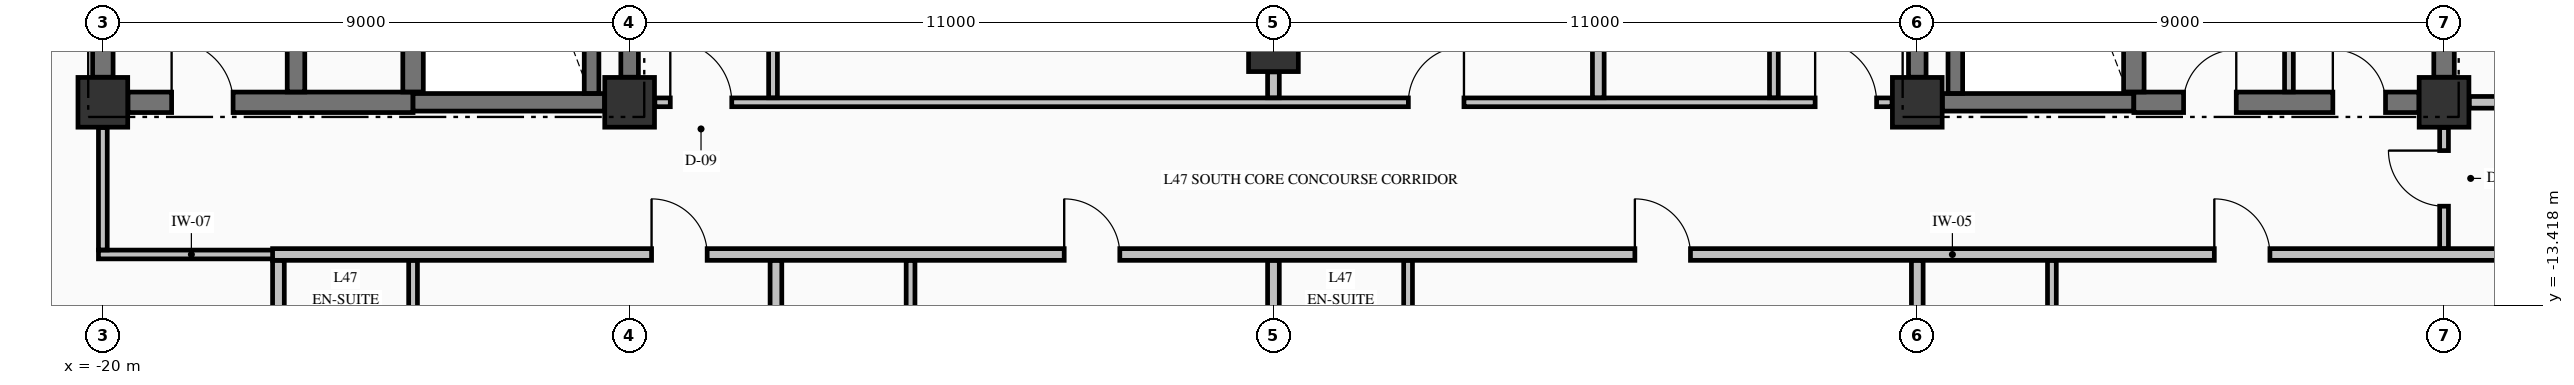
"""IFC4 building model, lengths in metres.
Left out: names, types, materials, properties, quantities, classifications, styles, units other than length and angle.
Written with IfcOpenShell. Run it as: python <this file> out.ifc"""

import sys

from ifc_helpers import new_model, si_unit, direction, frame, frame_2d, origin, origin_2d, place, context, subcontext, project, spatial, rectangle, extrude, element, fill, save


model = new_model("IFC4")
c1 = context("Model", 3, precision=1e-05, world=origin(), true_north=direction((0.0, 1.0)))
c2 = subcontext(c1, "Body", "Model", "MODEL_VIEW")
j1 = project(units=[si_unit("LENGTHUNIT", "METRE"), si_unit("PLANEANGLEUNIT", "RADIAN")], contexts=[c1])
p1 = place(None, origin())
s1 = spatial("IfcSite", under=j1, at=p1, CompositionType="ELEMENT")
p2 = place(p1, origin())
s2 = spatial("IfcBuilding", under=s1, at=p2, CompositionType="ELEMENT")
p3 = place(p2, frame((0.0, 0.0, 183.06)))
s3 = spatial("IfcBuildingStorey", under=s2, at=p3, CompositionType="ELEMENT", Elevation=183.06)
for number, where, z_axis, x_axis in (
    (1, (-20.0, -9.95, -0.25), (0.0, 0.0, 1.0), (1.0, 0.0, 0.0)),
    (2, (-11.0, -9.95, -0.25), (0.0, 0.0, 1.0), (1.0, 0.0, 0.0)),
    (3, (11.0, -9.95, -0.25), (0.0, 0.0, 1.0), (1.0, 0.0, 0.0)),
    (4, (20.0, -9.95, -0.25), (0.0, 0.0, 1.0), (1.0, 0.0, 0.0)),
    (5, (0.0, -9.0, -0.25), (0.0, 0.0, 1.0), (1.0, 0.0, 0.0)),
):
    element("IfcColumn", number, at=place(p3, frame(where, z_axis=z_axis, x_axis=x_axis)), inside=s3, PredefinedType="COLUMN", context=c2, shape_type="SweptSolid", body=[
        extrude(rectangle(XDim=0.85, YDim=0.85, at=origin_2d()), origin(), (0.0, 0.0, 1.0), 3.225),
    ])
p4 = place(p3, frame((-19.571, -9.95, 0.0), z_axis=(0.0, 0.0, 1.0), x_axis=(1.0, 0.0, 0.0)))
e6 = element("IfcWall", 6, at=p4, inside=s3, PredefinedType="SHEAR", context=c2, shape_type="SweptSolid", body=[
    extrude(rectangle(XDim=4.871, YDim=0.35, at=frame_2d((2.436, 0.0))), origin(), (0.0, 0.0, 1.0), 2.975),
])
p5 = place(p4, frame((0.746, 0.0, 0.0)))
e7 = element("IfcOpeningElement", 7, at=p5, cuts=e6, PredefinedType="OPENING", context=c2, shape_type="SweptSolid", body=[
    extrude(rectangle(XDim=1.05, YDim=2.15, at=frame_2d((0.525, 1.075))), frame((0.0, 0.185, 0.0), z_axis=(0.0, -1.0, 0.0), x_axis=(1.0, 0.0, 0.0)), (0.0, 0.0, 1.0), 0.37),
])
for number, where, z_axis, x_axis in (
    (8, (-14.7, -9.95, 0.0), (0.0, 0.0, 1.0), (1.0, 0.0, 0.0)),
    (9, (11.429, -9.95, 0.0), (0.0, 0.0, 1.0), (1.0, 0.0, 0.0)),
):
    element("IfcWall", number, at=place(p3, frame(where, z_axis=z_axis, x_axis=x_axis)), inside=s3, PredefinedType="SHEAR", context=c2, shape_type="SweptSolid", body=[
        extrude(rectangle(XDim=3.271, YDim=0.3, at=frame_2d((1.635, 0.0))), origin(), (0.0, 0.0, 1.0), 2.975),
    ])
p6 = place(p3, frame((14.7, -9.95, 0.0), z_axis=(0.0, 0.0, 1.0), x_axis=(1.0, 0.0, 0.0)))
e10 = element("IfcWall", 10, at=p6, inside=s3, PredefinedType="SHEAR", context=c2, shape_type="SweptSolid", body=[
    extrude(rectangle(XDim=4.871, YDim=0.35, at=frame_2d((2.436, 0.0))), origin(), (0.0, 0.0, 1.0), 2.975),
])
p7 = place(p6, frame((0.85, 0.0, 0.0)))
e11 = element("IfcOpeningElement", 11, at=p7, cuts=e10, PredefinedType="OPENING", context=c2, shape_type="SweptSolid", body=[
    extrude(rectangle(XDim=0.9, YDim=2.15, at=frame_2d((0.45, 1.075))), frame((0.0, 0.185, 0.0), z_axis=(0.0, -1.0, 0.0), x_axis=(1.0, 0.0, 0.0)), (0.0, 0.0, 1.0), 0.37),
])
p8 = place(p6, frame((3.4, 0.0, 0.0)))
e12 = element("IfcOpeningElement", 12, at=p8, cuts=e10, PredefinedType="OPENING", context=c2, shape_type="SweptSolid", body=[
    extrude(rectangle(XDim=0.9, YDim=2.15, at=frame_2d((0.45, 1.075))), frame((0.0, 0.185, 0.0), z_axis=(0.0, -1.0, 0.0), x_axis=(1.0, 0.0, 0.0)), (0.0, 0.0, 1.0), 0.37),
])
p9 = place(p3, frame((-20.075, -12.55, 0.0), z_axis=(0.0, 0.0, 1.0), x_axis=(1.0, 0.0, 0.0)))
e13 = element("IfcWall", 13, at=p9, inside=s3, PredefinedType="PARTITIONING", context=c2, shape_type="SweptSolid", body=[
    extrude(rectangle(XDim=3.175, YDim=0.15, at=frame_2d((1.587, 0.0))), origin(), (0.0, 0.0, 1.0), 2.975),
])
p10 = place(p3, frame((-17.1, -12.55, 0.0), z_axis=(0.0, 0.0, 1.0), x_axis=(1.0, 0.0, 0.0)))
e14 = element("IfcWall", 14, at=p10, inside=s3, PredefinedType="PARTITIONING", context=c2, shape_type="SweptSolid", body=[
    extrude(rectangle(XDim=39.2, YDim=0.2, at=frame_2d((19.6, 0.0))), origin(), (0.0, 0.0, 1.0), 2.975),
])
p11 = place(p10, frame((6.475, 0.0, 0.0)))
e15 = element("IfcOpeningElement", 15, at=p11, cuts=e14, PredefinedType="OPENING", context=c2, shape_type="SweptSolid", body=[
    extrude(rectangle(XDim=0.95, YDim=2.15, at=frame_2d((0.475, 1.075))), frame((0.0, 0.11, 0.0), z_axis=(0.0, -1.0, 0.0), x_axis=(1.0, 0.0, 0.0)), (0.0, 0.0, 1.0), 0.22),
])
p12 = place(p10, frame((13.525, 0.0, 0.0)))
e16 = element("IfcOpeningElement", 16, at=p12, cuts=e14, PredefinedType="OPENING", context=c2, shape_type="SweptSolid", body=[
    extrude(rectangle(XDim=0.95, YDim=2.15, at=frame_2d((0.475, 1.075))), frame((0.0, 0.11, 0.0), z_axis=(0.0, -1.0, 0.0), x_axis=(1.0, 0.0, 0.0)), (0.0, 0.0, 1.0), 0.22),
])
p13 = place(p10, frame((23.275, 0.0, 0.0)))
e17 = element("IfcOpeningElement", 17, at=p13, cuts=e14, PredefinedType="OPENING", context=c2, shape_type="SweptSolid", body=[
    extrude(rectangle(XDim=0.95, YDim=2.15, at=frame_2d((0.475, 1.075))), frame((0.0, 0.11, 0.0), z_axis=(0.0, -1.0, 0.0), x_axis=(1.0, 0.0, 0.0)), (0.0, 0.0, 1.0), 0.22),
])
p14 = place(p10, frame((33.175, 0.0, 0.0)))
e18 = element("IfcOpeningElement", 18, at=p14, cuts=e14, PredefinedType="OPENING", context=c2, shape_type="SweptSolid", body=[
    extrude(rectangle(XDim=0.95, YDim=2.15, at=frame_2d((0.475, 1.075))), frame((0.0, 0.11, 0.0), z_axis=(0.0, -1.0, 0.0), x_axis=(1.0, 0.0, 0.0)), (0.0, 0.0, 1.0), 0.22),
])
p15 = place(p3, frame((-10.569, -9.95, 0.0), z_axis=(0.0, 0.0, 1.0), x_axis=(1.0, 0.0, 0.0)))
e19 = element("IfcWall", 19, at=p15, inside=s3, PredefinedType="PARTITIONING", context=c2, shape_type="SweptSolid", body=[
    extrude(rectangle(XDim=21.138, YDim=0.15, at=frame_2d((10.569, 0.0))), origin(), (0.0, 0.0, 1.0), 2.975),
])
p16 = place(p15, frame((0.264, 0.0, 0.0)))
e20 = element("IfcOpeningElement", 20, at=p16, cuts=e19, PredefinedType="OPENING", context=c2, shape_type="SweptSolid", body=[
    extrude(rectangle(XDim=1.05, YDim=2.15, at=frame_2d((0.525, 1.075))), frame((0.0, 0.085, 0.0), z_axis=(0.0, -1.0, 0.0), x_axis=(1.0, 0.0, 0.0)), (0.0, 0.0, 1.0), 0.17),
])
p17 = place(p15, frame((19.824, 0.0, 0.0)))
e21 = element("IfcOpeningElement", 21, at=p17, cuts=e19, PredefinedType="OPENING", context=c2, shape_type="SweptSolid", body=[
    extrude(rectangle(XDim=1.05, YDim=2.15, at=frame_2d((0.525, 1.075))), frame((0.0, 0.085, 0.0), z_axis=(0.0, -1.0, 0.0), x_axis=(1.0, 0.0, 0.0)), (0.0, 0.0, 1.0), 0.17),
])
p18 = place(p15, frame((12.874, 0.0, 0.0)))
e22 = element("IfcOpeningElement", 22, at=p18, cuts=e19, PredefinedType="OPENING", context=c2, shape_type="SweptSolid", body=[
    extrude(rectangle(XDim=0.95, YDim=2.15, at=frame_2d((0.475, 1.075))), frame((0.0, 0.085, 0.0), z_axis=(0.0, -1.0, 0.0), x_axis=(1.0, 0.0, 0.0)), (0.0, 0.0, 1.0), 0.17),
])
p19 = place(p3, frame((20.431, -9.95, 0.0), z_axis=(0.0, 0.0, 1.0), x_axis=(1.0, 0.0, 0.0)))
e23 = element("IfcWall", 23, at=p19, inside=s3, PredefinedType="PARTITIONING", context=c2, shape_type="SweptSolid", body=[
    extrude(rectangle(XDim=6.404, YDim=0.2, at=frame_2d((3.202, 0.0))), origin(), (0.0, 0.0, 1.0), 2.975),
])
p20 = place(p19, frame((2.594, 0.0, 0.0)))
e24 = element("IfcOpeningElement", 24, at=p20, cuts=e23, PredefinedType="OPENING", context=c2, shape_type="SweptSolid", body=[
    extrude(rectangle(XDim=0.95, YDim=2.15, at=frame_2d((0.475, 1.075))), frame((0.0, 0.11, 0.0), z_axis=(0.0, -1.0, 0.0), x_axis=(1.0, 0.0, 0.0)), (0.0, 0.0, 1.0), 0.22),
])
p21 = place(p3, frame((-20.0, -9.521, 0.0), z_axis=(0.0, 0.0, 1.0), x_axis=(0.0, 1.0, 0.0)))
e25 = element("IfcWall", 25, at=p21, inside=s3, PredefinedType="SHEAR", context=c2, shape_type="SweptSolid", body=[
    extrude(rectangle(XDim=9.092, YDim=0.35, at=frame_2d((4.546, 0.0))), origin(), (0.0, 0.0, 1.0), 2.975),
])
p22 = place(p3, frame((-16.7, -9.773, 0.0), z_axis=(0.0, 0.0, 1.0), x_axis=(0.0, 1.0, 0.0)))
e26 = element("IfcWall", 26, at=p22, inside=s3, PredefinedType="SHEAR", context=c2, shape_type="SweptSolid", body=[
    extrude(rectangle(XDim=9.371, YDim=0.3, at=frame_2d((4.686, 0.0))), origin(), (0.0, 0.0, 1.0), 2.975),
])
p23 = place(p3, frame((-14.7, -9.773, 0.0), z_axis=(0.0, 0.0, 1.0), x_axis=(0.0, 1.0, 0.0)))
e27 = element("IfcWall", 27, at=p23, inside=s3, PredefinedType="SHEAR", context=c2, shape_type="SweptSolid", body=[
    extrude(rectangle(XDim=9.371, YDim=0.35, at=frame_2d((4.686, 0.0))), origin(), (0.0, 0.0, 1.0), 2.975),
])
p24 = place(p3, frame((-11.65, -9.798, 0.0), z_axis=(0.0, 0.0, 1.0), x_axis=(0.0, 1.0, 0.0)))
e28 = element("IfcWall", 28, at=p24, inside=s3, PredefinedType="SOLIDWALL", context=c2, shape_type="SweptSolid", body=[
    extrude(rectangle(XDim=9.396, YDim=0.25, at=frame_2d((4.698, 0.0))), origin(), (0.0, 0.0, 1.0), 2.975),
])
for number, where, z_axis, x_axis in (
    (29, (-11.0, -9.521, 0.0), (0.0, 0.0, 1.0), (0.0, 1.0, 0.0)),
    (30, (11.0, -9.521, 0.0), (0.0, 0.0, 1.0), (0.0, 1.0, 0.0)),
):
    element("IfcWall", number, at=place(p3, frame(where, z_axis=z_axis, x_axis=x_axis)), inside=s3, PredefinedType="SHEAR", context=c2, shape_type="SweptSolid", body=[
        extrude(rectangle(XDim=9.092, YDim=0.3, at=frame_2d((4.546, 0.0))), origin(), (0.0, 0.0, 1.0), 2.975),
    ])
p25 = place(p3, frame((11.65, -9.798, 0.0), z_axis=(0.0, 0.0, 1.0), x_axis=(0.0, 1.0, 0.0)))
e31 = element("IfcWall", 31, at=p25, inside=s3, PredefinedType="SOLIDWALL", context=c2, shape_type="SweptSolid", body=[
    extrude(rectangle(XDim=9.396, YDim=0.25, at=frame_2d((4.698, 0.0))), origin(), (0.0, 0.0, 1.0), 2.975),
])
p26 = place(p3, frame((14.7, -9.773, 0.0), z_axis=(0.0, 0.0, 1.0), x_axis=(0.0, 1.0, 0.0)))
e32 = element("IfcWall", 32, at=p26, inside=s3, PredefinedType="SHEAR", context=c2, shape_type="SweptSolid", body=[
    extrude(rectangle(XDim=9.371, YDim=0.35, at=frame_2d((4.686, 0.0))), origin(), (0.0, 0.0, 1.0), 2.975),
])
p27 = place(p3, frame((20.0, -9.521, 0.0), z_axis=(0.0, 0.0, 1.0), x_axis=(0.0, 1.0, 0.0)))
e33 = element("IfcWall", 33, at=p27, inside=s3, PredefinedType="SHEAR", context=c2, shape_type="SweptSolid", body=[
    extrude(rectangle(XDim=9.092, YDim=0.35, at=frame_2d((4.546, 0.0))), origin(), (0.0, 0.0, 1.0), 2.975),
])
p28 = place(p3, frame((-20.0, -12.472, 0.0), z_axis=(0.0, 0.0, 1.0), x_axis=(0.0, 1.0, 0.0)))
e34 = element("IfcWall", 34, at=p28, inside=s3, PredefinedType="PARTITIONING", context=c2, shape_type="SweptSolid", body=[
    extrude(rectangle(XDim=2.091, YDim=0.15, at=frame_2d((1.045, 0.0))), origin(), (0.0, 0.0, 1.0), 2.167),
])
p29 = place(p3, frame((-17.0, -15.422, 0.0), z_axis=(0.0, 0.0, 1.0), x_axis=(0.0, 1.0, 0.0)))
e35 = element("IfcWall", 35, at=p29, inside=s3, PredefinedType="PARTITIONING", context=c2, shape_type="SweptSolid", body=[
    extrude(rectangle(XDim=2.769, YDim=0.2, at=frame_2d((1.385, 0.0))), origin(), (0.0, 0.0, 1.0), 2.975),
])
p30 = place(p3, frame((-14.7, -15.422, 0.0), z_axis=(0.0, 0.0, 1.0), x_axis=(0.0, 1.0, 0.0)))
e36 = element("IfcWall", 36, at=p30, inside=s3, PredefinedType="PARTITIONING", context=c2, shape_type="SweptSolid", body=[
    extrude(rectangle(XDim=2.769, YDim=0.15, at=frame_2d((1.385, 0.0))), origin(), (0.0, 0.0, 1.0), 2.975),
])
p31 = place(p3, frame((-8.55, -9.872, 0.0), z_axis=(0.0, 0.0, 1.0), x_axis=(0.0, 1.0, 0.0)))
e37 = element("IfcWall", 37, at=p31, inside=s3, PredefinedType="PARTITIONING", context=c2, shape_type="SweptSolid", body=[
    extrude(rectangle(XDim=12.969, YDim=0.15, at=frame_2d((6.484, 0.0))), origin(), (0.0, 0.0, 1.0), 2.975),
])
p32 = place(p31, frame((6.002, 0.0, 0.0)))
e38 = element("IfcOpeningElement", 38, at=p32, cuts=e37, PredefinedType="OPENING", context=c2, shape_type="SweptSolid", body=[
    extrude(rectangle(XDim=1.0, YDim=2.15, at=frame_2d((0.5, 1.075))), frame((0.0, 0.085, 0.0), z_axis=(0.0, -1.0, 0.0), x_axis=(1.0, 0.0, 0.0)), (0.0, 0.0, 1.0), 0.17),
])
p33 = place(p3, frame((-8.5, -14.722, 0.0), z_axis=(0.0, 0.0, 1.0), x_axis=(0.0, 1.0, 0.0)))
e39 = element("IfcWall", 39, at=p33, inside=s3, PredefinedType="PARTITIONING", context=c2, shape_type="SweptSolid", body=[
    extrude(rectangle(XDim=2.069, YDim=0.2, at=frame_2d((1.034, 0.0))), origin(), (0.0, 0.0, 1.0), 2.975),
])
p34 = place(p3, frame((-6.2, -14.722, 0.0), z_axis=(0.0, 0.0, 1.0), x_axis=(0.0, 1.0, 0.0)))
e40 = element("IfcWall", 40, at=p34, inside=s3, PredefinedType="PARTITIONING", context=c2, shape_type="SweptSolid", body=[
    extrude(rectangle(XDim=2.069, YDim=0.15, at=frame_2d((1.034, 0.0))), origin(), (0.0, 0.0, 1.0), 2.975),
])
p35 = place(p3, frame((0.0, -15.422, 0.0), z_axis=(0.0, 0.0, 1.0), x_axis=(0.0, 1.0, 0.0)))
e41 = element("IfcWall", 41, at=p35, inside=s3, PredefinedType="PARTITIONING", context=c2, shape_type="SweptSolid", body=[
    extrude(rectangle(XDim=2.769, YDim=0.2, at=frame_2d((1.385, 0.0))), origin(), (0.0, 0.0, 1.0), 2.167),
])
p36 = place(p3, frame((0.0, -9.872, 0.0), z_axis=(0.0, 0.0, 1.0), x_axis=(0.0, 1.0, 0.0)))
e42 = element("IfcWall", 42, at=p36, inside=s3, PredefinedType="PARTITIONING", context=c2, shape_type="SweptSolid", body=[
    extrude(rectangle(XDim=0.441, YDim=0.2, at=frame_2d((0.221, 0.0))), origin(), (0.0, 0.0, 1.0), 2.167),
])
p37 = place(p3, frame((2.3, -15.422, 0.0), z_axis=(0.0, 0.0, 1.0), x_axis=(0.0, 1.0, 0.0)))
e43 = element("IfcWall", 43, at=p37, inside=s3, PredefinedType="PARTITIONING", context=c2, shape_type="SweptSolid", body=[
    extrude(rectangle(XDim=2.769, YDim=0.15, at=frame_2d((1.385, 0.0))), origin(), (0.0, 0.0, 1.0), 2.975),
])
p38 = place(p3, frame((5.55, -9.872, 0.0), z_axis=(0.0, 0.0, 1.0), x_axis=(0.0, 1.0, 0.0)))
e44 = element("IfcWall", 44, at=p38, inside=s3, PredefinedType="PARTITIONING", context=c2, shape_type="SweptSolid", body=[
    extrude(rectangle(XDim=4.569, YDim=0.2, at=frame_2d((2.285, 0.0))), origin(), (0.0, 0.0, 1.0), 2.975),
])
p39 = place(p3, frame((8.55, -9.872, 0.0), z_axis=(0.0, 0.0, 1.0), x_axis=(0.0, 1.0, 0.0)))
e45 = element("IfcWall", 45, at=p39, inside=s3, PredefinedType="PARTITIONING", context=c2, shape_type="SweptSolid", body=[
    extrude(rectangle(XDim=4.569, YDim=0.15, at=frame_2d((2.285, 0.0))), origin(), (0.0, 0.0, 1.0), 2.975),
])
p40 = place(p39, frame((1.847, 0.0, 0.0)))
e46 = element("IfcOpeningElement", 46, at=p40, cuts=e45, PredefinedType="OPENING", context=c2, shape_type="SweptSolid", body=[
    extrude(rectangle(XDim=0.95, YDim=2.15, at=frame_2d((0.475, 1.075))), frame((0.0, 0.085, 0.0), z_axis=(0.0, -1.0, 0.0), x_axis=(1.0, 0.0, 0.0)), (0.0, 0.0, 1.0), 0.17),
])
p41 = place(p3, frame((11.0, -14.722, 0.0), z_axis=(0.0, 0.0, 1.0), x_axis=(0.0, 1.0, 0.0)))
e47 = element("IfcWall", 47, at=p41, inside=s3, PredefinedType="PARTITIONING", context=c2, shape_type="SweptSolid", body=[
    extrude(rectangle(XDim=2.069, YDim=0.2, at=frame_2d((1.034, 0.0))), origin(), (0.0, 0.0, 1.0), 2.167),
])
p42 = place(p3, frame((13.3, -14.722, 0.0), z_axis=(0.0, 0.0, 1.0), x_axis=(0.0, 1.0, 0.0)))
e48 = element("IfcWall", 48, at=p42, inside=s3, PredefinedType="PARTITIONING", context=c2, shape_type="SweptSolid", body=[
    extrude(rectangle(XDim=2.069, YDim=0.15, at=frame_2d((1.034, 0.0))), origin(), (0.0, 0.0, 1.0), 2.975),
])
p43 = place(p3, frame((17.35, -9.772, 0.0), z_axis=(0.0, 0.0, 1.0), x_axis=(0.0, 1.0, 0.0)))
e49 = element("IfcWall", 49, at=p43, inside=s3, PredefinedType="PARTITIONING", context=c2, shape_type="SweptSolid", body=[
    extrude(rectangle(XDim=14.494, YDim=0.15, at=frame_2d((7.247, 0.0))), origin(), (0.0, 0.0, 1.0), 2.975),
])
p44 = place(p3, frame((20.0, -12.447, 0.0), z_axis=(0.0, 0.0, 1.0), x_axis=(0.0, 1.0, 0.0)))
e50 = element("IfcWall", 50, at=p44, inside=s3, PredefinedType="PARTITIONING", context=c2, shape_type="SweptSolid", body=[
    extrude(rectangle(XDim=2.066, YDim=0.15, at=frame_2d((1.033, 0.0))), origin(), (0.0, 0.0, 1.0), 2.167),
])
p45 = place(p44, frame((0.722, 0.0, 0.0)))
e51 = element("IfcOpeningElement", 51, at=p45, cuts=e50, PredefinedType="OPENING", context=c2, shape_type="SweptSolid", body=[
    extrude(rectangle(XDim=0.95, YDim=2.02, at=frame_2d((0.475, 1.01))), frame((0.0, 0.085, 0.0), z_axis=(0.0, -1.0, 0.0), x_axis=(1.0, 0.0, 0.0)), (0.0, 0.0, 1.0), 0.17),
])
p46 = place(p5, origin())
e52 = element("IfcDoor", 52, at=p46, inside=s3, OperationType="SINGLE_SWING_LEFT", PredefinedType="DOOR", context=c2, shape_type="SweptSolid", body=[
    extrude(rectangle(XDim=1.05, YDim=2.15, at=frame_2d((0.525, 1.075))), frame((0.0, 0.025, 0.0), z_axis=(0.0, -1.0, 0.0), x_axis=(1.0, 0.0, 0.0)), (0.0, 0.0, 1.0), 0.05),
])
fill(e7, e52)
p47 = place(p7, origin())
e53 = element("IfcDoor", 53, at=p47, inside=s3, OperationType="SINGLE_SWING_RIGHT", PredefinedType="DOOR", context=c2, shape_type="SweptSolid", body=[
    extrude(rectangle(XDim=0.9, YDim=2.15, at=frame_2d((0.45, 1.075))), frame((0.0, 0.025, 0.0), z_axis=(0.0, -1.0, 0.0), x_axis=(1.0, 0.0, 0.0)), (0.0, 0.0, 1.0), 0.05),
])
fill(e11, e53)
p48 = place(p8, origin())
e54 = element("IfcDoor", 54, at=p48, inside=s3, OperationType="SINGLE_SWING_LEFT", PredefinedType="DOOR", context=c2, shape_type="SweptSolid", body=[
    extrude(rectangle(XDim=0.9, YDim=2.15, at=frame_2d((0.45, 1.075))), frame((0.0, 0.025, 0.0), z_axis=(0.0, -1.0, 0.0), x_axis=(1.0, 0.0, 0.0)), (0.0, 0.0, 1.0), 0.05),
])
fill(e12, e54)
p49 = place(p16, origin())
e55 = element("IfcDoor", 55, at=p49, inside=s3, OperationType="SINGLE_SWING_LEFT", PredefinedType="DOOR", context=c2, shape_type="SweptSolid", body=[
    extrude(rectangle(XDim=1.05, YDim=2.15, at=frame_2d((0.525, 1.075))), frame((0.0, 0.025, 0.0), z_axis=(0.0, -1.0, 0.0), x_axis=(1.0, 0.0, 0.0)), (0.0, 0.0, 1.0), 0.05),
])
fill(e20, e55)
p50 = place(p17, origin())
e56 = element("IfcDoor", 56, at=p50, inside=s3, OperationType="SINGLE_SWING_LEFT", PredefinedType="DOOR", context=c2, shape_type="SweptSolid", body=[
    extrude(rectangle(XDim=1.05, YDim=2.15, at=frame_2d((0.525, 1.075))), frame((0.0, 0.025, 0.0), z_axis=(0.0, -1.0, 0.0), x_axis=(1.0, 0.0, 0.0)), (0.0, 0.0, 1.0), 0.05),
])
fill(e21, e56)
p51 = place(p11, origin())
e57 = element("IfcDoor", 57, at=p51, inside=s3, OperationType="SINGLE_SWING_LEFT", PredefinedType="DOOR", context=c2, shape_type="SweptSolid", body=[
    extrude(rectangle(XDim=0.95, YDim=2.15, at=frame_2d((0.475, 1.075))), frame((0.0, 0.025, 0.0), z_axis=(0.0, -1.0, 0.0), x_axis=(1.0, 0.0, 0.0)), (0.0, 0.0, 1.0), 0.05),
])
fill(e15, e57)
p52 = place(p12, origin())
e58 = element("IfcDoor", 58, at=p52, inside=s3, OperationType="SINGLE_SWING_LEFT", PredefinedType="DOOR", context=c2, shape_type="SweptSolid", body=[
    extrude(rectangle(XDim=0.95, YDim=2.15, at=frame_2d((0.475, 1.075))), frame((0.0, 0.025, 0.0), z_axis=(0.0, -1.0, 0.0), x_axis=(1.0, 0.0, 0.0)), (0.0, 0.0, 1.0), 0.05),
])
fill(e16, e58)
p53 = place(p13, origin())
e59 = element("IfcDoor", 59, at=p53, inside=s3, OperationType="SINGLE_SWING_LEFT", PredefinedType="DOOR", context=c2, shape_type="SweptSolid", body=[
    extrude(rectangle(XDim=0.95, YDim=2.15, at=frame_2d((0.475, 1.075))), frame((0.0, 0.025, 0.0), z_axis=(0.0, -1.0, 0.0), x_axis=(1.0, 0.0, 0.0)), (0.0, 0.0, 1.0), 0.05),
])
fill(e17, e59)
p54 = place(p14, origin())
e60 = element("IfcDoor", 60, at=p54, inside=s3, OperationType="SINGLE_SWING_LEFT", PredefinedType="DOOR", context=c2, shape_type="SweptSolid", body=[
    extrude(rectangle(XDim=0.95, YDim=2.15, at=frame_2d((0.475, 1.075))), frame((0.0, 0.025, 0.0), z_axis=(0.0, -1.0, 0.0), x_axis=(1.0, 0.0, 0.0)), (0.0, 0.0, 1.0), 0.05),
])
fill(e18, e60)
p55 = place(p18, origin())
e61 = element("IfcDoor", 61, at=p55, inside=s3, OperationType="SINGLE_SWING_RIGHT", PredefinedType="DOOR", context=c2, shape_type="SweptSolid", body=[
    extrude(rectangle(XDim=0.95, YDim=2.15, at=frame_2d((0.475, 1.075))), frame((0.0, 0.025, 0.0), z_axis=(0.0, -1.0, 0.0), x_axis=(1.0, 0.0, 0.0)), (0.0, 0.0, 1.0), 0.05),
])
fill(e22, e61)
p56 = place(p45, origin())
e62 = element("IfcDoor", 62, at=p56, inside=s3, OperationType="SINGLE_SWING_RIGHT", PredefinedType="DOOR", context=c2, shape_type="SweptSolid", body=[
    extrude(rectangle(XDim=0.95, YDim=2.02, at=frame_2d((0.475, 1.01))), frame((0.0, 0.025, 0.0), z_axis=(0.0, -1.0, 0.0), x_axis=(1.0, 0.0, 0.0)), (0.0, 0.0, 1.0), 0.05),
])
fill(e51, e62)
save(model, sys.argv[1])
